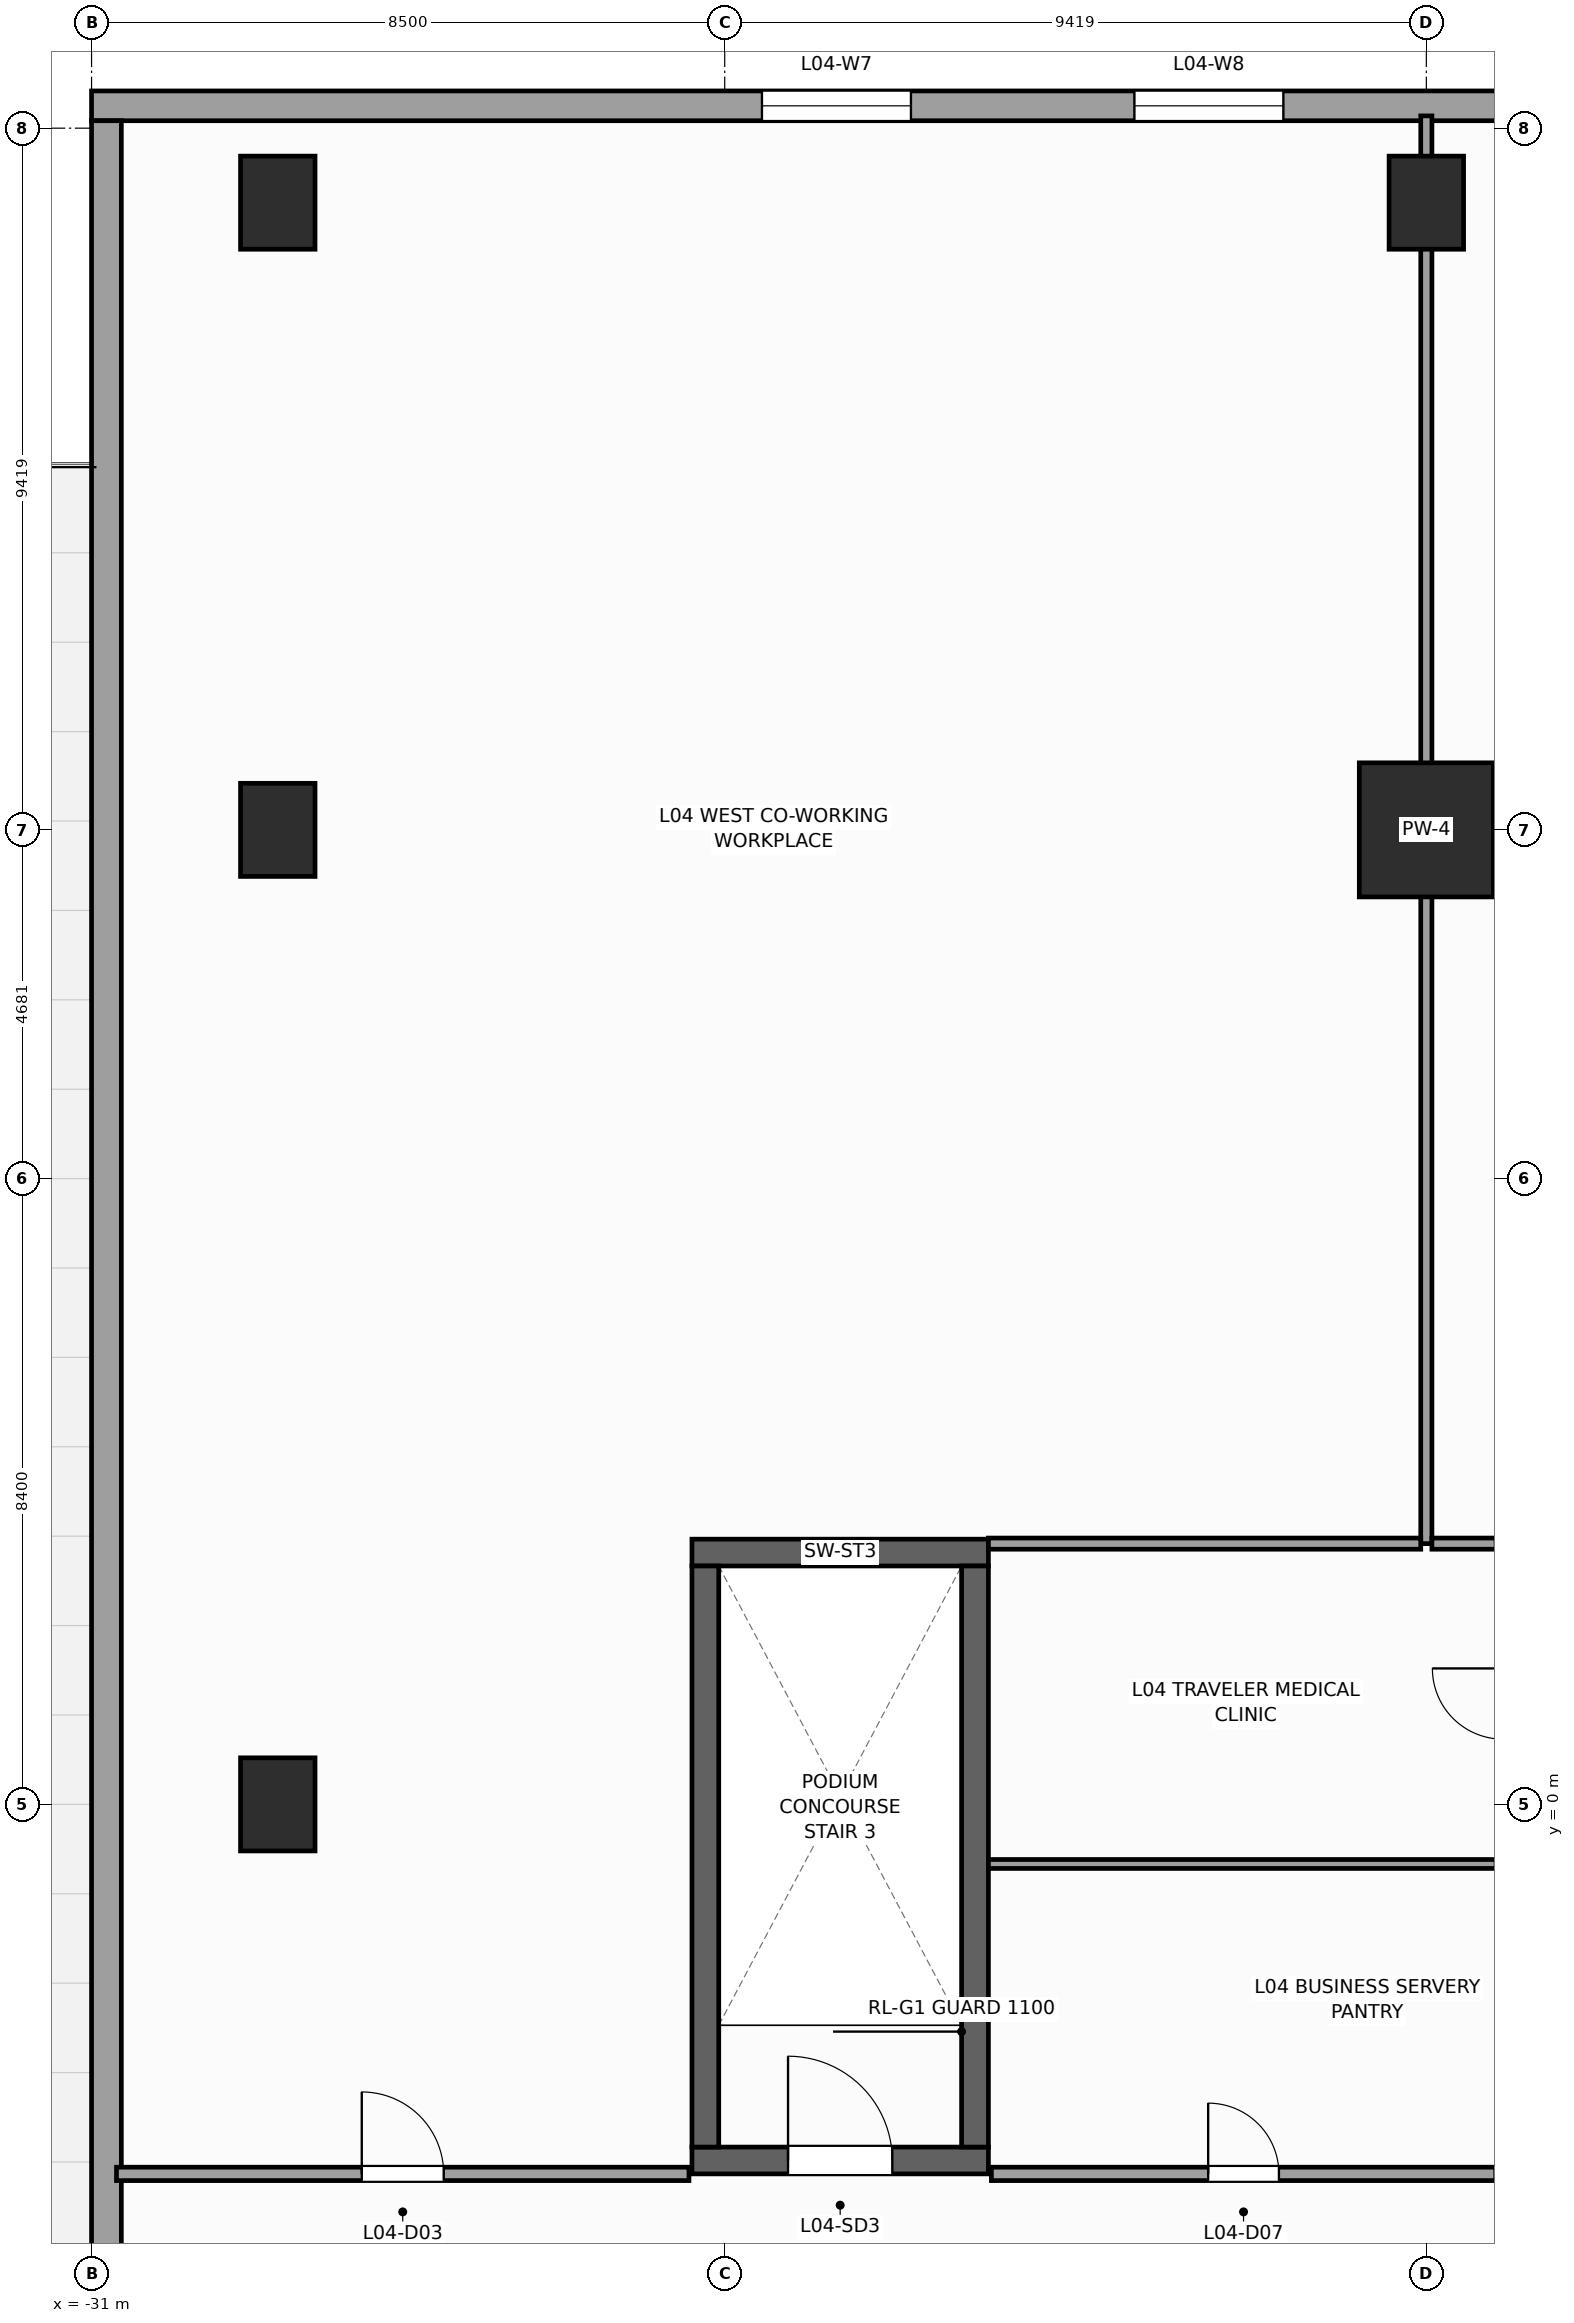
"""IFC4 building model, lengths in metres.
Left out: names, types, materials, properties, quantities, classifications, styles, units other than length and angle.
Written with IfcOpenShell. Run it as: python <this file> out.ifc"""

import sys

from ifc_helpers import new_model, si_unit, direction, frame, frame_2d, origin, origin_2d, place, context, subcontext, project, spatial, rectangle, extrude, source, transform, mapped, element, fill, save


model = new_model("IFC4")
c1 = context("Model", 3, precision=1e-05, world=origin(), true_north=direction((0.0, 1.0)))
c2 = subcontext(c1, "Body", "Model", "MODEL_VIEW")
j1 = project(units=[si_unit("LENGTHUNIT", "METRE"), si_unit("PLANEANGLEUNIT", "RADIAN")], contexts=[c1])
p1 = place(None, origin())
s1 = spatial("IfcSite", under=j1, at=p1, CompositionType="ELEMENT")
p2 = place(p1, origin())
s2 = spatial("IfcBuilding", under=s1, at=p2, CompositionType="ELEMENT")
p3 = place(p2, frame((0.0, 0.0, 21.0)))
s3 = spatial("IfcBuildingStorey", under=s2, at=p3, CompositionType="ELEMENT", Elevation=21.0)
p4 = place(p3, frame((-22.94, -4.78, 0.0), z_axis=(0.0, 0.0, 1.0), x_axis=(1.0, 0.0, 0.0)))
e1 = element("IfcWall", 1, at=p4, inside=s3, PredefinedType="SHEAR", context=c2, shape_type="SweptSolid", body=[
    extrude(rectangle(XDim=3.98, YDim=0.36, at=frame_2d((1.99, 0.0))), origin(), (0.0, 0.0, 1.0), 5.0),
])
p5 = place(p4, frame((1.29, 0.0, 0.0)))
e2 = element("IfcOpeningElement", 2, at=p5, cuts=e1, PredefinedType="OPENING", context=c2, shape_type="SweptSolid", body=[
    extrude(rectangle(XDim=1.4, YDim=2.2, at=frame_2d((0.7, 1.1))), frame((0.0, 0.19, 0.0), z_axis=(0.0, -1.0, 0.0), x_axis=(1.0, 0.0, 0.0)), (0.0, 0.0, 1.0), 0.38),
])
p6 = place(p3, frame((-22.94, 3.38, 0.0), z_axis=(0.0, 0.0, 1.0), x_axis=(1.0, 0.0, 0.0)))
e3 = element("IfcWall", 3, at=p6, inside=s3, PredefinedType="SHEAR", context=c2, shape_type="SweptSolid", body=[
    extrude(rectangle(XDim=3.98, YDim=0.36, at=frame_2d((1.99, 0.0))), origin(), (0.0, 0.0, 1.0), 5.0),
])
for number, where, z_axis, x_axis in (
    (4, (-22.76, -4.6, 0.0), (0.0, 0.0, 1.0), (0.0, 1.0, 0.0)),
    (5, (-19.14, -4.6, 0.0), (0.0, 0.0, 1.0), (0.0, 1.0, 0.0)),
):
    element("IfcWall", number, at=place(p3, frame(where, z_axis=z_axis, x_axis=x_axis)), inside=s3, PredefinedType="SHEAR", context=c2, shape_type="SweptSolid", body=[
        extrude(rectangle(XDim=7.8, YDim=0.36, at=frame_2d((3.9, 0.0))), origin(), (0.0, 0.0, 1.0), 5.0),
    ])
m1 = source(origin(), c2, "Body", "SweptSolid", [
    extrude(rectangle(XDim=1.8, YDim=1.8, at=origin_2d()), origin(), (0.0, 0.0, 1.0), 5.0),
])
p7 = place(p3, frame((-13.081, 13.081, 0.0), z_axis=(0.0, 0.0, 1.0), x_axis=(1.0, 0.0, 0.0)))
e6 = element("IfcColumn", 6, at=p7, inside=s3, PredefinedType="COLUMN", context=c2, shape_type="MappedRepresentation", body=[
    mapped(m1, transform((0.0, 0.0, 0.0), scale=1.0)),
])
m2 = source(origin(), c2, "Body", "SweptSolid", [
    extrude(rectangle(XDim=1.0, YDim=1.25, at=origin_2d()), origin(), (0.0, 0.0, 1.0), 5.0),
])
for number, where, z_axis, x_axis in (
    (7, (-28.5, 21.5, 0.0), (0.0, 0.0, 1.0), (1.0, 0.0, 0.0)),
    (8, (-13.081, 21.5, 0.0), (0.0, 0.0, 1.0), (1.0, 0.0, 0.0)),
    (9, (-28.5, 0.0, 0.0), (0.0, 0.0, 1.0), (1.0, 0.0, 0.0)),
    (10, (-28.5, 13.081, 0.0), (0.0, 0.0, 1.0), (1.0, 0.0, 0.0)),
):
    element("IfcColumn", number, at=place(p3, frame(where, z_axis=z_axis, x_axis=x_axis)), inside=s3, PredefinedType="COLUMN", context=c2, shape_type="MappedRepresentation", body=[
        mapped(m2, transform((0.0, 0.0, 0.0), scale=1.0)),
    ])
p8 = place(p3, frame((-31.0, 22.8, 0.0), z_axis=(0.0, 0.0, 1.0), x_axis=(1.0, 0.0, 0.0)))
e11 = element("IfcWall", 11, at=p8, inside=s3, PredefinedType="STANDARD", context=c2, shape_type="SweptSolid", body=[
    extrude(rectangle(XDim=32.5, YDim=0.4, at=frame_2d((16.25, 0.0))), origin(), (0.0, 0.0, 1.0), 4.72),
])
p9 = place(p8, frame((9.0, 0.0, 0.65)))
e12 = element("IfcOpeningElement", 12, at=p9, cuts=e11, PredefinedType="OPENING", context=c2, shape_type="SweptSolid", body=[
    extrude(rectangle(XDim=2.0, YDim=1.45, at=frame_2d((1.0, 0.725))), frame((0.0, 0.21, 0.0), z_axis=(0.0, -1.0, 0.0), x_axis=(1.0, 0.0, 0.0)), (0.0, 0.0, 1.0), 0.42),
])
p10 = place(p8, frame((14.0, 0.0, 0.65)))
e13 = element("IfcOpeningElement", 13, at=p10, cuts=e11, PredefinedType="OPENING", context=c2, shape_type="SweptSolid", body=[
    extrude(rectangle(XDim=2.0, YDim=1.45, at=frame_2d((1.0, 0.725))), frame((0.0, 0.21, 0.0), z_axis=(0.0, -1.0, 0.0), x_axis=(1.0, 0.0, 0.0)), (0.0, 0.0, 1.0), 0.42),
])
p11 = place(p8, frame((19.5, 0.0, 0.65)))
e14 = element("IfcOpeningElement", 14, at=p11, cuts=e11, PredefinedType="OPENING", context=c2, shape_type="SweptSolid", body=[
    extrude(rectangle(XDim=2.0, YDim=1.45, at=frame_2d((1.0, 0.725))), frame((0.0, 0.21, 0.0), z_axis=(0.0, -1.0, 0.0), x_axis=(1.0, 0.0, 0.0)), (0.0, 0.0, 1.0), 0.42),
])
p12 = place(p3, frame((-30.8, -22.6, 0.0), z_axis=(0.0, 0.0, 1.0), x_axis=(0.0, 1.0, 0.0)))
e15 = element("IfcWall", 15, at=p12, inside=s3, PredefinedType="STANDARD", context=c2, shape_type="SweptSolid", body=[
    extrude(rectangle(XDim=45.2, YDim=0.4, at=frame_2d((22.6, 0.0))), origin(), (0.0, 0.0, 1.0), 4.72),
])
p13 = place(p12, frame((13.5, 0.0, 0.0)))
e16 = element("IfcOpeningElement", 16, at=p13, cuts=e15, PredefinedType="OPENING", context=c2, shape_type="SweptSolid", body=[
    extrude(rectangle(XDim=1.2, YDim=2.3, at=frame_2d((0.6, 1.15))), frame((0.0, 0.21, 0.0), z_axis=(0.0, -1.0, 0.0), x_axis=(1.0, 0.0, 0.0)), (0.0, 0.0, 1.0), 0.42),
])
p14 = place(p3, frame((-30.665, -4.96, 0.0), z_axis=(0.0, 0.0, 1.0), x_axis=(1.0, 0.0, 0.0)))
e17 = element("IfcWall", 17, at=p14, inside=s3, PredefinedType="PARTITIONING", context=c2, shape_type="SweptSolid", body=[
    extrude(rectangle(XDim=7.685, YDim=0.18, at=frame_2d((3.843, 0.0))), origin(), (0.0, 0.0, 1.0), 4.72),
])
p15 = place(p14, frame((3.292, 0.0, 0.0)))
e18 = element("IfcOpeningElement", 18, at=p15, cuts=e17, PredefinedType="OPENING", context=c2, shape_type="SweptSolid", body=[
    extrude(rectangle(XDim=1.1, YDim=2.2, at=frame_2d((0.55, 1.1))), frame((0.0, 0.1, 0.0), z_axis=(0.0, -1.0, 0.0), x_axis=(1.0, 0.0, 0.0)), (0.0, 0.0, 1.0), 0.2),
])
p16 = place(p3, frame((-18.92, -4.96, 0.0), z_axis=(0.0, 0.0, 1.0), x_axis=(1.0, 0.0, 0.0)))
e19 = element("IfcWall", 19, at=p16, inside=s3, PredefinedType="PARTITIONING", context=c2, shape_type="SweptSolid", body=[
    extrude(rectangle(XDim=6.77, YDim=0.18, at=frame_2d((3.385, 0.0))), origin(), (0.0, 0.0, 1.0), 4.72),
])
p17 = place(p16, frame((2.91, 0.0, 0.0)))
e20 = element("IfcOpeningElement", 20, at=p17, cuts=e19, PredefinedType="OPENING", context=c2, shape_type="SweptSolid", body=[
    extrude(rectangle(XDim=0.95, YDim=2.15, at=frame_2d((0.475, 1.075))), frame((0.0, 0.1, 0.0), z_axis=(0.0, -1.0, 0.0), x_axis=(1.0, 0.0, 0.0)), (0.0, 0.0, 1.0), 0.2),
])
p18 = place(p3, frame((-13.081, 3.5, 0.0), z_axis=(0.0, 0.0, 1.0), x_axis=(0.0, 1.0, 0.0)))
e21 = element("IfcWall", 21, at=p18, inside=s3, PredefinedType="PARTITIONING", context=c2, shape_type="SweptSolid", body=[
    extrude(rectangle(XDim=19.165, YDim=0.15, at=frame_2d((9.583, 0.0))), origin(), (0.0, 0.0, 1.0), 2.88),
])
p19 = place(p3, frame((-18.96, 3.5, 0.0), z_axis=(0.0, 0.0, 1.0), x_axis=(1.0, 0.0, 0.0)))
e22 = element("IfcWall", 22, at=p19, inside=s3, PredefinedType="PARTITIONING", context=c2, shape_type="SweptSolid", body=[
    extrude(rectangle(XDim=5.804, YDim=0.15, at=frame_2d((2.902, 0.0))), origin(), (0.0, 0.0, 1.0), 4.72),
])
p20 = place(p3, frame((-13.006, 3.5, 0.0), z_axis=(0.0, 0.0, 1.0), x_axis=(1.0, 0.0, 0.0)))
e23 = element("IfcWall", 23, at=p20, inside=s3, PredefinedType="PARTITIONING", context=c2, shape_type="SweptSolid", body=[
    extrude(rectangle(XDim=0.861, YDim=0.15, at=frame_2d((0.431, 0.0))), origin(), (0.0, 0.0, 1.0), 4.72),
])
p21 = place(p3, frame((-18.96, -0.8, 0.0), z_axis=(0.0, 0.0, 1.0), x_axis=(1.0, 0.0, 0.0)))
e24 = element("IfcWall", 24, at=p21, inside=s3, PredefinedType="PARTITIONING", context=c2, shape_type="SweptSolid", body=[
    extrude(rectangle(XDim=6.815, YDim=0.12, at=frame_2d((3.407, 0.0))), origin(), (0.0, 0.0, 1.0), 2.75),
])
m3 = source(origin(), c2, "Body", "SweptSolid", [
    extrude(rectangle(XDim=2.0, YDim=1.45, at=frame_2d((1.0, 0.725))), frame((0.0, 0.03, 0.0), z_axis=(0.0, -1.0, 0.0), x_axis=(1.0, 0.0, 0.0)), (0.0, 0.0, 1.0), 0.06),
])
p22 = place(p9, origin())
e25 = element("IfcWindow", 25, at=p22, inside=s3, PartitioningType="SINGLE_PANEL", PredefinedType="WINDOW", context=c2, shape_type="MappedRepresentation", body=[
    mapped(m3, transform((0.0, 0.0, 0.0), scale=1.0)),
])
fill(e12, e25)
p23 = place(p10, origin())
e26 = element("IfcWindow", 26, at=p23, inside=s3, PartitioningType="SINGLE_PANEL", PredefinedType="WINDOW", context=c2, shape_type="MappedRepresentation", body=[
    mapped(m3, transform((0.0, 0.0, 0.0), scale=1.0)),
])
fill(e13, e26)
m4 = source(origin(), c2, "Body", "SweptSolid", [
    extrude(rectangle(XDim=1.4, YDim=2.2, at=frame_2d((0.7, 1.1))), frame((0.0, 0.025, 0.0), z_axis=(0.0, -1.0, 0.0), x_axis=(1.0, 0.0, 0.0)), (0.0, 0.0, 1.0), 0.05),
])
p24 = place(p5, origin())
e27 = element("IfcDoor", 27, at=p24, inside=s3, OperationType="SINGLE_SWING_LEFT", PredefinedType="DOOR", context=c2, shape_type="MappedRepresentation", body=[
    mapped(m4, transform((0.0, 0.0, 0.0), scale=1.0)),
])
fill(e2, e27)
m5 = source(origin(), c2, "Body", "SweptSolid", [
    extrude(rectangle(XDim=1.1, YDim=2.2, at=frame_2d((0.55, 1.1))), frame((0.0, 0.025, 0.0), z_axis=(0.0, -1.0, 0.0), x_axis=(1.0, 0.0, 0.0)), (0.0, 0.0, 1.0), 0.05),
])
p25 = place(p15, origin())
e28 = element("IfcDoor", 28, at=p25, inside=s3, OperationType="SINGLE_SWING_LEFT", PredefinedType="DOOR", context=c2, shape_type="MappedRepresentation", body=[
    mapped(m5, transform((0.0, 0.0, 0.0), scale=1.0)),
])
fill(e18, e28)
m6 = source(origin(), c2, "Body", "SweptSolid", [
    extrude(rectangle(XDim=0.95, YDim=2.15, at=frame_2d((0.475, 1.075))), frame((0.0, 0.025, 0.0), z_axis=(0.0, -1.0, 0.0), x_axis=(1.0, 0.0, 0.0)), (0.0, 0.0, 1.0), 0.05),
])
p26 = place(p17, origin())
e29 = element("IfcDoor", 29, at=p26, inside=s3, OperationType="SINGLE_SWING_LEFT", PredefinedType="DOOR", context=c2, shape_type="MappedRepresentation", body=[
    mapped(m6, transform((0.0, 0.0, 0.0), scale=1.0)),
])
fill(e20, e29)
save(model, sys.argv[1])
